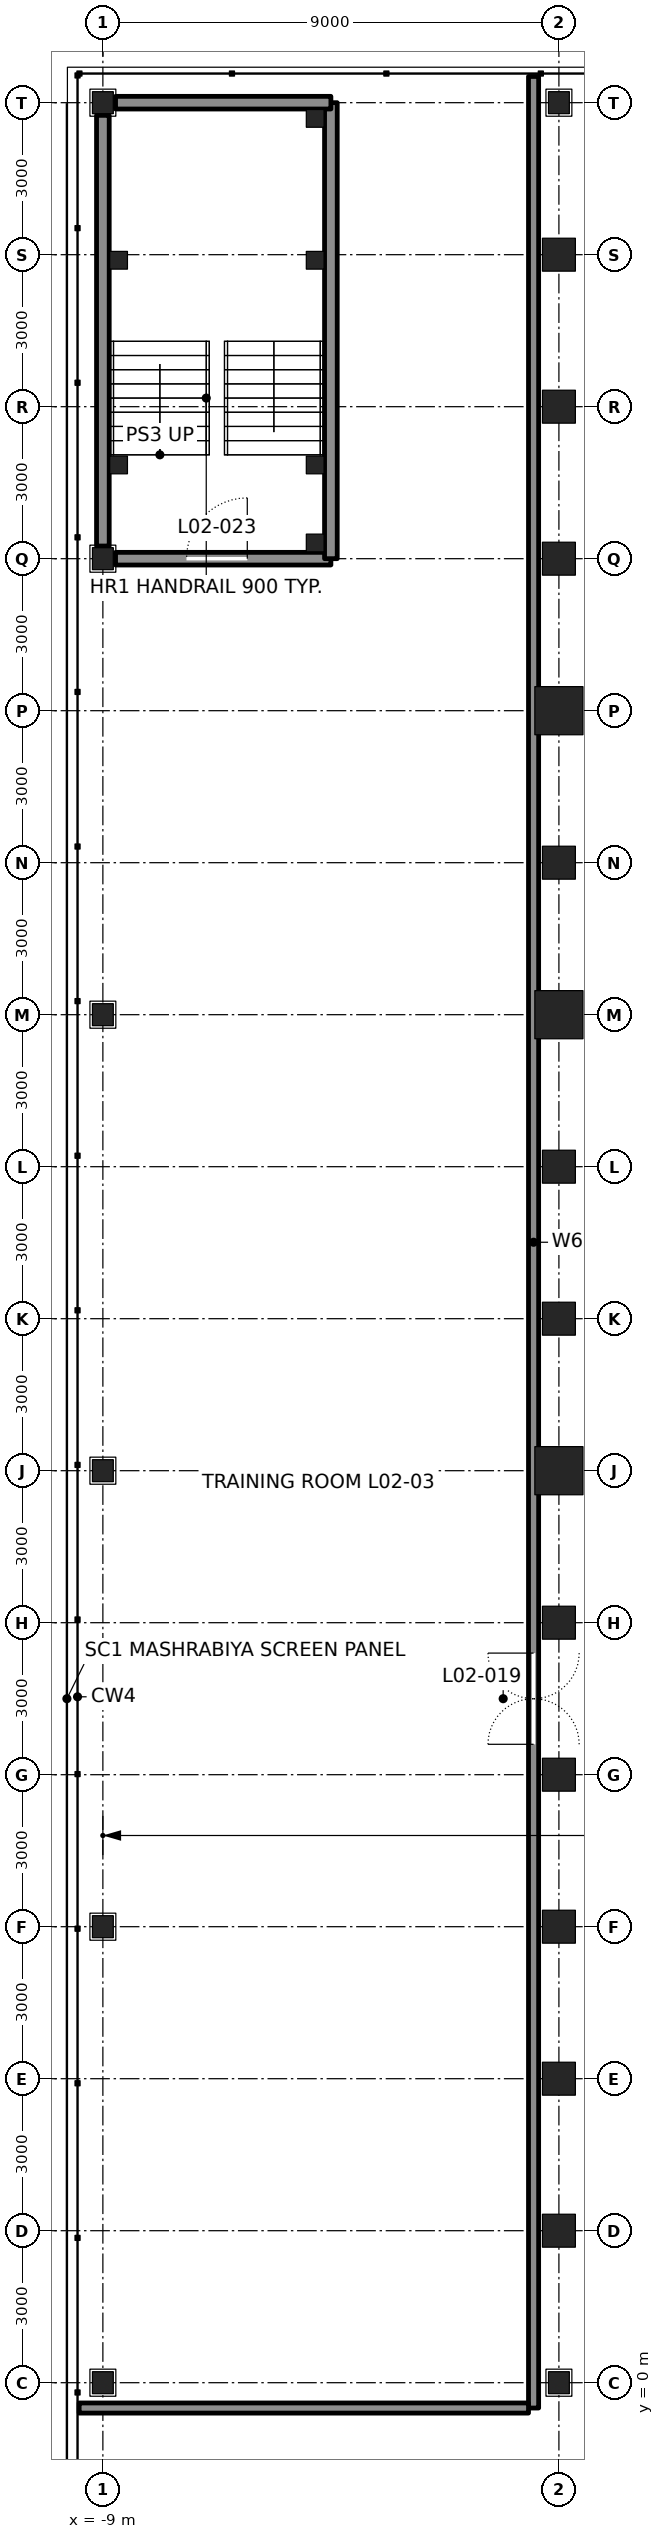
"""IFC4 building model, lengths in metres.
Left out: names, types, materials, properties, quantities, classifications, styles, units other than length and angle.
Written with IfcOpenShell. Run it as: python <this file> out.ifc"""

import sys

from ifc_helpers import new_model, si_unit, direction, frame, frame_2d, origin, origin_2d, place, context, subcontext, project, spatial, rectangle, hollow_rectangle, i_section, extrude, element, fill, save


model = new_model("IFC4")
c1 = context("Model", 3, precision=1e-05, world=origin(), true_north=direction((0.0, 1.0)))
c2 = subcontext(c1, "Body", "Model", "MODEL_VIEW")
j1 = project(units=[si_unit("LENGTHUNIT", "METRE"), si_unit("PLANEANGLEUNIT", "RADIAN")], contexts=[c1])
p1 = place(None, origin())
s1 = spatial("IfcSite", under=j1, at=p1, CompositionType="ELEMENT")
p2 = place(p1, origin())
s2 = spatial("IfcBuilding", under=s1, at=p2, CompositionType="ELEMENT")
p3 = place(p2, frame((0.0, 0.0, 13.5)))
s3 = spatial("IfcBuildingStorey", under=s2, at=p3, CompositionType="ELEMENT", Elevation=13.5)
for number, where, z_axis, x_axis in (
    (1, (0.0, 42.0, 0.0), (0.0, 0.0, 1.0), (-1.0, 0.0, 0.0)),
    (2, (0.0, 39.0, 0.0), (0.0, 0.0, 1.0), (-1.0, 0.0, 0.0)),
    (3, (0.0, 36.0, 0.0), (0.0, 0.0, 1.0), (-1.0, 0.0, 0.0)),
):
    element("IfcColumn", number, at=place(p3, frame(where, z_axis=z_axis, x_axis=x_axis)), inside=s3, PredefinedType="COLUMN", context=c2, shape_type="SweptSolid", body=[
        extrude(hollow_rectangle(XDim=0.65, YDim=0.65, WallThickness=0.065, at=origin_2d()), origin(), (0.0, 0.0, 1.0), 6.0),
    ])
p4 = place(p3, frame((0.0, 33.0, 0.0), z_axis=(0.0, 0.0, 1.0), x_axis=(-1.0, 0.0, 0.0)))
e4 = element("IfcColumn", 4, at=p4, inside=s3, PredefinedType="COLUMN", context=c2, shape_type="SweptSolid", body=[
    extrude(hollow_rectangle(XDim=0.95, YDim=0.95, WallThickness=0.11, at=origin_2d()), origin(), (0.0, 0.0, 1.0), 6.0),
])
p5 = place(p3, frame((0.0, 30.0, 0.0), z_axis=(0.0, 0.0, 1.0), x_axis=(-1.0, 0.0, 0.0)))
e5 = element("IfcColumn", 5, at=p5, inside=s3, PredefinedType="COLUMN", context=c2, shape_type="SweptSolid", body=[
    extrude(hollow_rectangle(XDim=0.65, YDim=0.65, WallThickness=0.065, at=origin_2d()), origin(), (0.0, 0.0, 1.0), 6.0),
])
p6 = place(p3, frame((0.0, 27.0, 0.0), z_axis=(0.0, 0.0, 1.0), x_axis=(-1.0, 0.0, 0.0)))
e6 = element("IfcColumn", 6, at=p6, inside=s3, PredefinedType="COLUMN", context=c2, shape_type="SweptSolid", body=[
    extrude(hollow_rectangle(XDim=0.95, YDim=0.95, WallThickness=0.11, at=origin_2d()), origin(), (0.0, 0.0, 1.0), 6.0),
])
for number, where, z_axis, x_axis in (
    (7, (0.0, 24.0, 0.0), (0.0, 0.0, 1.0), (-1.0, 0.0, 0.0)),
    (8, (0.0, 21.0, 0.0), (0.0, 0.0, 1.0), (-1.0, 0.0, 0.0)),
):
    element("IfcColumn", number, at=place(p3, frame(where, z_axis=z_axis, x_axis=x_axis)), inside=s3, PredefinedType="COLUMN", context=c2, shape_type="SweptSolid", body=[
        extrude(hollow_rectangle(XDim=0.65, YDim=0.65, WallThickness=0.065, at=origin_2d()), origin(), (0.0, 0.0, 1.0), 6.0),
    ])
p7 = place(p3, frame((0.0, 18.0, 0.0), z_axis=(0.0, 0.0, 1.0), x_axis=(-1.0, 0.0, 0.0)))
e9 = element("IfcColumn", 9, at=p7, inside=s3, PredefinedType="COLUMN", context=c2, shape_type="SweptSolid", body=[
    extrude(hollow_rectangle(XDim=0.95, YDim=0.95, WallThickness=0.11, at=origin_2d()), origin(), (0.0, 0.0, 1.0), 6.0),
])
for number, where, z_axis, x_axis in (
    (10, (0.0, 15.0, 0.0), (0.0, 0.0, 1.0), (-1.0, 0.0, 0.0)),
    (11, (0.0, 12.0, 0.0), (0.0, 0.0, 1.0), (-1.0, 0.0, 0.0)),
    (12, (0.0, 9.0, 0.0), (0.0, 0.0, 1.0), (-1.0, 0.0, 0.0)),
    (13, (0.0, 6.0, 0.0), (0.0, 0.0, 1.0), (-1.0, 0.0, 0.0)),
    (14, (0.0, 3.0, 0.0), (0.0, 0.0, 1.0), (-1.0, 0.0, 0.0)),
):
    element("IfcColumn", number, at=place(p3, frame(where, z_axis=z_axis, x_axis=x_axis)), inside=s3, PredefinedType="COLUMN", context=c2, shape_type="SweptSolid", body=[
        extrude(hollow_rectangle(XDim=0.65, YDim=0.65, WallThickness=0.065, at=origin_2d()), origin(), (0.0, 0.0, 1.0), 6.0),
    ])
for number, where, z_axis, x_axis in (
    (15, (-9.0, 0.0, 0.0), (0.0, 0.0, 1.0), (1.0, 0.0, 0.0)),
    (16, (-9.0, 9.0, 0.0), (0.0, 0.0, 1.0), (1.0, 0.0, 0.0)),
    (17, (-9.0, 18.0, 0.0), (0.0, 0.0, 1.0), (1.0, 0.0, 0.0)),
    (18, (-9.0, 27.0, 0.0), (0.0, 0.0, 1.0), (1.0, 0.0, 0.0)),
    (19, (-9.0, 36.0, 0.0), (0.0, 0.0, 1.0), (1.0, 0.0, 0.0)),
    (20, (-9.0, 45.0, 0.0), (0.0, 0.0, 1.0), (1.0, 0.0, 0.0)),
    (21, (0.0, 0.0, 0.0), (0.0, 0.0, 1.0), (1.0, 0.0, 0.0)),
    (22, (0.0, 45.0, 0.0), (0.0, 0.0, 1.0), (1.0, 0.0, 0.0)),
):
    element("IfcColumn", number, at=place(p3, frame(where, z_axis=z_axis, x_axis=x_axis)), inside=s3, PredefinedType="COLUMN", context=c2, shape_type="SweptSolid", body=[
        extrude(i_section(OverallWidth=0.411, OverallDepth=0.434, WebThickness=0.036, FlangeThickness=0.057, at=origin_2d()), origin(), (0.0, 0.0, 1.0), 6.0),
    ])
p8 = place(p3, frame((-0.5, -0.5, 0.0), z_axis=(0.0, 0.0, 1.0), x_axis=(0.0, 1.0, 0.0)))
e23 = element("IfcWall", 23, at=p8, inside=s3, PredefinedType="PARTITIONING", context=c2, shape_type="SweptSolid", body=[
    extrude(rectangle(XDim=46.018, YDim=0.2, at=frame_2d((23.009, 0.0))), origin(), (0.0, 0.0, 1.0), 5.8),
])
p9 = place(p8, frame((13.1, 0.0, 0.0)))
e24 = element("IfcOpeningElement", 24, at=p9, cuts=e23, PredefinedType="OPENING", context=c2, shape_type="SweptSolid", body=[
    extrude(rectangle(XDim=1.8, YDim=2.4, at=frame_2d((0.9, 1.2))), frame((0.0, 0.11, 0.0), z_axis=(0.0, -1.0, 0.0), x_axis=(1.0, 0.0, 0.0)), (0.0, 0.0, 1.0), 0.22),
])
p10 = place(p3, frame((-9.468, -0.5, 0.0), z_axis=(0.0, 0.0, 1.0), x_axis=(1.0, 0.0, 0.0)))
e25 = element("IfcWall", 25, at=p10, inside=s3, PredefinedType="PARTITIONING", context=c2, shape_type="SweptSolid", body=[
    extrude(rectangle(XDim=8.868, YDim=0.2, at=frame_2d((4.434, 0.0))), origin(), (0.0, 0.0, 1.0), 5.8),
])
p11 = place(p3, frame((-8.75, 36.0, 0.0), z_axis=(0.0, 0.0, 1.0), x_axis=(1.0, 0.0, 0.0)))
e26 = element("IfcWall", 26, at=p11, inside=s3, PredefinedType="SOLIDWALL", context=c2, shape_type="SweptSolid", body=[
    extrude(rectangle(XDim=4.25, YDim=0.25, at=frame_2d((2.125, 0.0))), origin(), (0.0, 0.0, 1.0), 4.853),
])
p12 = place(p11, frame((1.4, 0.0, 0.0)))
e27 = element("IfcOpeningElement", 27, at=p12, cuts=e26, PredefinedType="OPENING", context=c2, shape_type="SweptSolid", body=[
    extrude(rectangle(XDim=1.2, YDim=2.1, at=frame_2d((0.6, 1.05))), frame((0.0, 0.135, 0.0), z_axis=(0.0, -1.0, 0.0), x_axis=(1.0, 0.0, 0.0)), (0.0, 0.0, 1.0), 0.27),
])
p13 = place(p3, frame((-4.5, 36.0, 0.0), z_axis=(0.0, 0.0, 1.0), x_axis=(0.0, 1.0, 0.0)))
e28 = element("IfcWall", 28, at=p13, inside=s3, PredefinedType="SOLIDWALL", context=c2, shape_type="SweptSolid", body=[
    extrude(rectangle(XDim=9.0, YDim=0.25, at=frame_2d((4.5, 0.0))), origin(), (0.0, 0.0, 1.0), 4.853),
])
p14 = place(p3, frame((-8.75, 45.0, 0.0), z_axis=(0.0, 0.0, 1.0), x_axis=(1.0, 0.0, 0.0)))
e29 = element("IfcWall", 29, at=p14, inside=s3, PredefinedType="SOLIDWALL", context=c2, shape_type="SweptSolid", body=[
    extrude(rectangle(XDim=4.25, YDim=0.25, at=frame_2d((2.125, 0.0))), origin(), (0.0, 0.0, 1.0), 4.853),
])
p15 = place(p3, frame((-9.0, 36.25, 0.0), z_axis=(0.0, 0.0, 1.0), x_axis=(0.0, 1.0, 0.0)))
e30 = element("IfcWall", 30, at=p15, inside=s3, PredefinedType="SOLIDWALL", context=c2, shape_type="SweptSolid", body=[
    extrude(rectangle(XDim=8.5, YDim=0.25, at=frame_2d((4.25, 0.0))), origin(), (0.0, 0.0, 1.0), 4.853),
])
for number, where, z_axis, x_axis in (
    (31, (-4.81, 44.69, 0.0), (0.0, 0.0, 1.0), (1.0, 0.0, 0.0)),
    (32, (-8.69, 41.89, 0.0), (0.0, 0.0, 1.0), (1.0, 0.0, 0.0)),
    (33, (-4.81, 41.89, 0.0), (0.0, 0.0, 1.0), (1.0, 0.0, 0.0)),
    (34, (-8.69, 37.85, 0.0), (0.0, 0.0, 1.0), (1.0, 0.0, 0.0)),
    (35, (-4.81, 37.85, 0.0), (0.0, 0.0, 1.0), (1.0, 0.0, 0.0)),
    (36, (-4.81, 36.31, 0.0), (0.0, 0.0, 1.0), (1.0, 0.0, 0.0)),
):
    element("IfcColumn", number, at=place(p3, frame(where, z_axis=z_axis, x_axis=x_axis)), inside=s3, PredefinedType="COLUMN", context=c2, shape_type="SweptSolid", body=[
        extrude(hollow_rectangle(XDim=0.35, YDim=0.35, WallThickness=0.035, at=origin_2d()), origin(), (0.0, 0.0, 1.0), 5.8),
    ])
p16 = place(p9, origin())
e37 = element("IfcDoor", 37, at=p16, inside=s3, OperationType="DOUBLE_DOOR_DOUBLE_SWING", PredefinedType="DOOR", context=c2, shape_type="SweptSolid", body=[
    extrude(rectangle(XDim=1.8, YDim=2.4, at=frame_2d((0.9, 1.2))), frame((0.0, 0.025, 0.0), z_axis=(0.0, -1.0, 0.0), x_axis=(1.0, 0.0, 0.0)), (0.0, 0.0, 1.0), 0.05),
])
fill(e24, e37)
p17 = place(p12, origin())
e38 = element("IfcDoor", 38, at=p17, inside=s3, OperationType="SINGLE_SWING_RIGHT", PredefinedType="DOOR", context=c2, shape_type="SweptSolid", body=[
    extrude(rectangle(XDim=1.2, YDim=2.1, at=frame_2d((0.6, 1.05))), frame((0.0, 0.025, 0.0), z_axis=(0.0, -1.0, 0.0), x_axis=(1.0, 0.0, 0.0)), (0.0, 0.0, 1.0), 0.05),
])
fill(e27, e38)
save(model, sys.argv[1])
